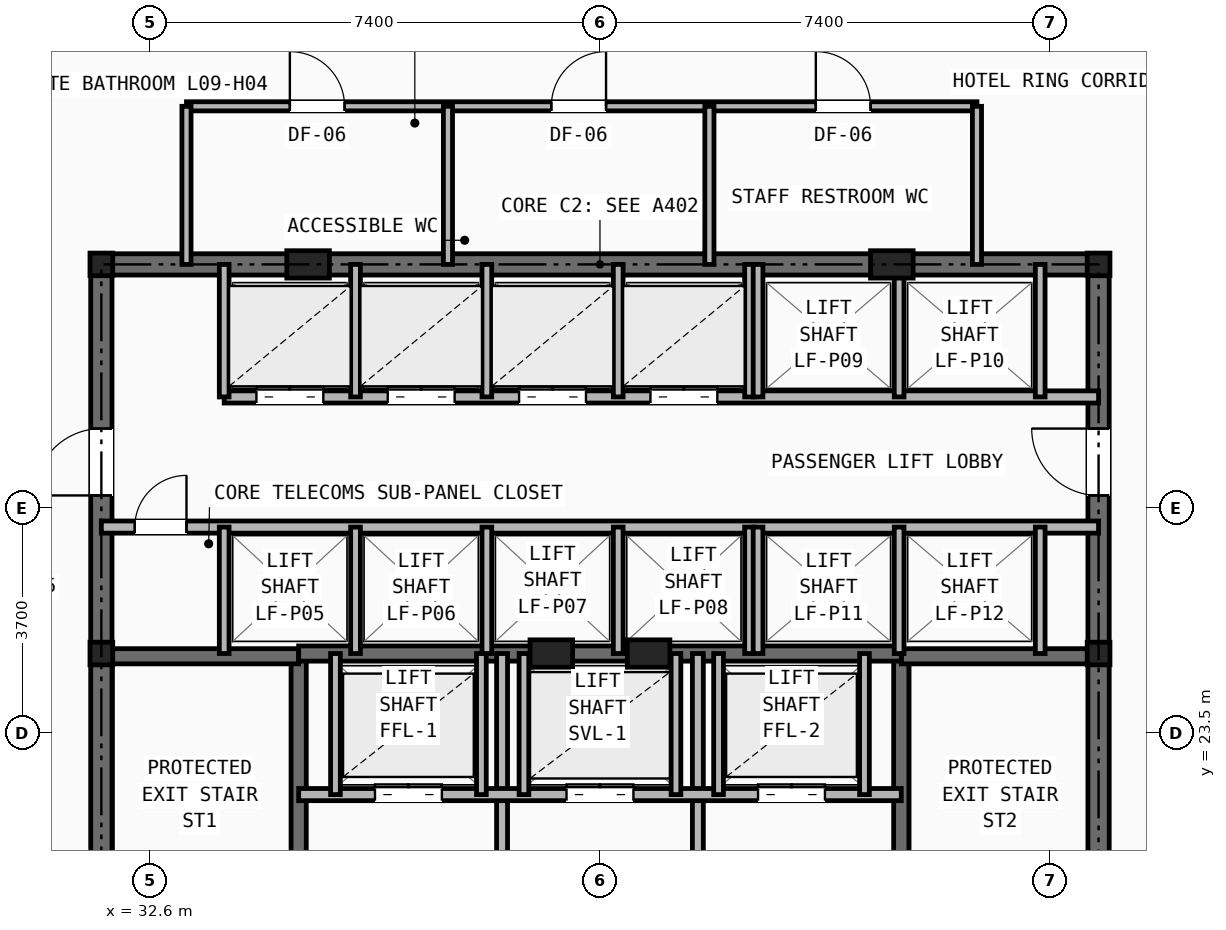
"""IFC4 building model, lengths in metres.
Left out: names, types, materials, properties, quantities, classifications, styles, units other than length and angle.
Written with IfcOpenShell. Run it as: python <this file> out.ifc"""

import sys

from ifc_helpers import new_model, si_unit, direction, frame, frame_2d, origin, origin_2d, place, context, subcontext, project, spatial, rectangle, i_section, extrude, element, fill, save


model = new_model("IFC4")
c1 = context("Model", 3, precision=1e-05, world=origin(), true_north=direction((0.0, 1.0)))
c2 = subcontext(c1, "Body", "Model", "MODEL_VIEW")
j1 = project(units=[si_unit("LENGTHUNIT", "METRE"), si_unit("PLANEANGLEUNIT", "RADIAN")], contexts=[c1])
p1 = place(None, origin())
s1 = spatial("IfcSite", under=j1, at=p1, CompositionType="ELEMENT")
p2 = place(p1, origin())
s2 = spatial("IfcBuilding", under=s1, at=p2, CompositionType="ELEMENT")
p3 = place(p2, frame((0.0, 0.0, 36.8)))
s3 = spatial("IfcBuildingStorey", under=s2, at=p3, CompositionType="ELEMENT", Elevation=36.8)
for number, where, z_axis, x_axis in (
    (1, (31.8, 24.8, 0.0), (0.0, 0.0, 1.0), (1.0, 0.0, 0.0)),
    (2, (48.2, 24.8, 0.0), (0.0, 0.0, 1.0), (1.0, 0.0, 0.0)),
    (3, (31.8, 31.2, 0.0), (0.0, 0.0, 1.0), (1.0, 0.0, 0.0)),
    (4, (48.2, 31.2, 0.0), (0.0, 0.0, 1.0), (1.0, 0.0, 0.0)),
):
    element("IfcColumn", number, at=place(p3, frame(where, z_axis=z_axis, x_axis=x_axis)), inside=s3, PredefinedType="COLUMN", context=c2, shape_type="SweptSolid", body=[
        extrude(i_section(OverallWidth=0.374, OverallDepth=0.372, WebThickness=0.016, FlangeThickness=0.026, at=origin_2d()), origin(), (0.0, 0.0, 1.0), 3.2),
    ])
for number, where, z_axis, x_axis in (
    (5, (35.2, 31.2, 0.0), (0.0, 0.0, 1.0), (1.0, 0.0, 0.0)),
    (6, (44.8, 31.2, 0.0), (0.0, 0.0, 1.0), (1.0, 0.0, 0.0)),
    (7, (39.2, 24.8, 0.0), (0.0, 0.0, 1.0), (1.0, 0.0, 0.0)),
    (8, (40.8, 24.8, 0.0), (0.0, 0.0, 1.0), (1.0, 0.0, 0.0)),
):
    element("IfcColumn", number, at=place(p3, frame(where, z_axis=z_axis, x_axis=x_axis)), inside=s3, PredefinedType="PILASTER", context=c2, shape_type="SweptSolid", body=[
        extrude(rectangle(XDim=0.7, YDim=0.45, at=origin_2d()), origin(), (0.0, 0.0, 1.0), 3.2),
    ])
p4 = place(p3, frame((31.8, 31.2, 0.0), z_axis=(0.0, 0.0, 1.0), x_axis=(1.0, 0.0, 0.0)))
e9 = element("IfcWall", 9, at=p4, inside=s3, PredefinedType="SHEAR", context=c2, shape_type="SweptSolid", body=[
    extrude(rectangle(XDim=16.4, YDim=0.35, at=frame_2d((8.2, 0.0))), origin(), (0.0, 0.0, 1.0), 2.98),
])
p5 = place(p3, frame((31.8, 16.4, 0.0), z_axis=(0.0, 0.0, 1.0), x_axis=(0.0, 1.0, 0.0)))
e10 = element("IfcWall", 10, at=p5, inside=s3, PredefinedType="SHEAR", context=c2, shape_type="SweptSolid", body=[
    extrude(rectangle(XDim=14.8, YDim=0.35, at=frame_2d((7.4, 0.0))), origin(), (0.0, 0.0, 1.0), 2.98),
])
p6 = place(p5, frame((11.0, 0.0, 0.0)))
e11 = element("IfcOpeningElement", 11, at=p6, cuts=e10, PredefinedType="OPENING", context=c2, shape_type="SweptSolid", body=[
    extrude(rectangle(XDim=1.1, YDim=2.15, at=frame_2d((0.55, 1.075))), frame((0.0, 0.185, 0.0), z_axis=(0.0, -1.0, 0.0), x_axis=(1.0, 0.0, 0.0)), (0.0, 0.0, 1.0), 0.37),
])
p7 = place(p3, frame((48.2, 16.4, 0.0), z_axis=(0.0, 0.0, 1.0), x_axis=(0.0, 1.0, 0.0)))
e12 = element("IfcWall", 12, at=p7, inside=s3, PredefinedType="SHEAR", context=c2, shape_type="SweptSolid", body=[
    extrude(rectangle(XDim=14.8, YDim=0.35, at=frame_2d((7.4, 0.0))), origin(), (0.0, 0.0, 1.0), 2.98),
])
p8 = place(p7, frame((11.0, 0.0, 0.0)))
e13 = element("IfcOpeningElement", 13, at=p8, cuts=e12, PredefinedType="OPENING", context=c2, shape_type="SweptSolid", body=[
    extrude(rectangle(XDim=1.1, YDim=2.15, at=frame_2d((0.55, 1.075))), frame((0.0, 0.185, 0.0), z_axis=(0.0, -1.0, 0.0), x_axis=(1.0, 0.0, 0.0)), (0.0, 0.0, 1.0), 0.37),
])
p9 = place(p3, frame((35.045, 16.4, 0.0), z_axis=(0.0, 0.0, 1.0), x_axis=(0.0, 1.0, 0.0)))
e14 = element("IfcWall", 14, at=p9, inside=s3, PredefinedType="SHEAR", context=c2, shape_type="SweptSolid", body=[
    extrude(rectangle(XDim=8.4, YDim=0.25, at=frame_2d((4.2, 0.0))), origin(), (0.0, 0.0, 1.0), 2.98),
])
p10 = place(p9, frame((0.45, 0.0, 0.0)))
e15 = element("IfcOpeningElement", 15, at=p10, cuts=e14, PredefinedType="OPENING", context=c2, shape_type="SweptSolid", body=[
    extrude(rectangle(XDim=0.95, YDim=2.1, at=frame_2d((0.475, 1.05))), frame((0.0, 0.135, 0.0), z_axis=(0.0, -1.0, 0.0), x_axis=(1.0, 0.0, 0.0)), (0.0, 0.0, 1.0), 0.27),
])
p11 = place(p3, frame((31.8, 24.755, 0.0), z_axis=(0.0, 0.0, 1.0), x_axis=(1.0, 0.0, 0.0)))
e16 = element("IfcWall", 16, at=p11, inside=s3, PredefinedType="SHEAR", context=c2, shape_type="SweptSolid", body=[
    extrude(rectangle(XDim=3.245, YDim=0.25, at=frame_2d((1.623, 0.0))), origin(), (0.0, 0.0, 1.0), 2.98),
])
p12 = place(p3, frame((44.955, 16.4, 0.0), z_axis=(0.0, 0.0, 1.0), x_axis=(0.0, 1.0, 0.0)))
e17 = element("IfcWall", 17, at=p12, inside=s3, PredefinedType="SHEAR", context=c2, shape_type="SweptSolid", body=[
    extrude(rectangle(XDim=8.4, YDim=0.25, at=frame_2d((4.2, 0.0))), origin(), (0.0, 0.0, 1.0), 2.98),
])
p13 = place(p12, frame((0.45, 0.0, 0.0)))
e18 = element("IfcOpeningElement", 18, at=p13, cuts=e17, PredefinedType="OPENING", context=c2, shape_type="SweptSolid", body=[
    extrude(rectangle(XDim=0.95, YDim=2.1, at=frame_2d((0.475, 1.05))), frame((0.0, 0.135, 0.0), z_axis=(0.0, -1.0, 0.0), x_axis=(1.0, 0.0, 0.0)), (0.0, 0.0, 1.0), 0.27),
])
p14 = place(p3, frame((44.955, 24.755, 0.0), z_axis=(0.0, 0.0, 1.0), x_axis=(1.0, 0.0, 0.0)))
e19 = element("IfcWall", 19, at=p14, inside=s3, PredefinedType="SHEAR", context=c2, shape_type="SweptSolid", body=[
    extrude(rectangle(XDim=3.245, YDim=0.25, at=frame_2d((1.623, 0.0))), origin(), (0.0, 0.0, 1.0), 2.98),
])
p15 = place(p3, frame((35.045, 24.8, 0.0), z_axis=(0.0, 0.0, 1.0), x_axis=(1.0, 0.0, 0.0)))
e20 = element("IfcWall", 20, at=p15, inside=s3, PredefinedType="SHEAR", context=c2, shape_type="SweptSolid", body=[
    extrude(rectangle(XDim=9.91, YDim=0.25, at=frame_2d((4.955, 0.0))), origin(), (0.0, 0.0, 1.0), 2.98),
])
p16 = place(p3, frame((38.39, 16.4, 0.0), z_axis=(0.0, 0.0, 1.0), x_axis=(0.0, 1.0, 0.0)))
e21 = element("IfcWall", 21, at=p16, inside=s3, PredefinedType="PARTITIONING", context=c2, shape_type="SweptSolid", body=[
    extrude(rectangle(XDim=8.4, YDim=0.18, at=frame_2d((4.2, 0.0))), origin(), (0.0, 0.0, 1.0), 2.431),
])
p17 = place(p16, frame((3.85, 0.0, 0.0)))
e22 = element("IfcOpeningElement", 22, at=p17, cuts=e21, PredefinedType="OPENING", context=c2, shape_type="SweptSolid", body=[
    extrude(rectangle(XDim=0.95, YDim=2.1, at=frame_2d((0.475, 1.05))), frame((0.0, 0.1, 0.0), z_axis=(0.0, -1.0, 0.0), x_axis=(1.0, 0.0, 0.0)), (0.0, 0.0, 1.0), 0.2),
])
p18 = place(p3, frame((41.61, 16.4, 0.0), z_axis=(0.0, 0.0, 1.0), x_axis=(0.0, 1.0, 0.0)))
e23 = element("IfcWall", 23, at=p18, inside=s3, PredefinedType="PARTITIONING", context=c2, shape_type="SweptSolid", body=[
    extrude(rectangle(XDim=8.4, YDim=0.18, at=frame_2d((4.2, 0.0))), origin(), (0.0, 0.0, 1.0), 2.431),
])
p19 = place(p3, frame((35.045, 22.48, 0.0), z_axis=(0.0, 0.0, 1.0), x_axis=(1.0, 0.0, 0.0)))
e24 = element("IfcWall", 24, at=p19, inside=s3, PredefinedType="SOLIDWALL", context=c2, shape_type="SweptSolid", body=[
    extrude(rectangle(XDim=9.91, YDim=0.2, at=frame_2d((4.955, 0.0))), origin(), (0.0, 0.0, 1.0), 2.98),
])
p20 = place(p19, frame((1.255, 0.0, 0.0)))
e25 = element("IfcOpeningElement", 25, at=p20, cuts=e24, PredefinedType="OPENING", context=c2, shape_type="SweptSolid", body=[
    extrude(rectangle(XDim=1.1, YDim=2.15, at=frame_2d((0.55, 1.075))), frame((0.0, 0.11, 0.0), z_axis=(0.0, -1.0, 0.0), x_axis=(1.0, 0.0, 0.0)), (0.0, 0.0, 1.0), 0.22),
])
p21 = place(p19, frame((7.555, 0.0, 0.0)))
e26 = element("IfcOpeningElement", 26, at=p21, cuts=e24, PredefinedType="OPENING", context=c2, shape_type="SweptSolid", body=[
    extrude(rectangle(XDim=1.1, YDim=2.15, at=frame_2d((0.55, 1.075))), frame((0.0, 0.11, 0.0), z_axis=(0.0, -1.0, 0.0), x_axis=(1.0, 0.0, 0.0)), (0.0, 0.0, 1.0), 0.22),
])
p22 = place(p19, frame((4.405, 0.0, 0.0)))
e27 = element("IfcOpeningElement", 27, at=p22, cuts=e24, PredefinedType="OPENING", context=c2, shape_type="SweptSolid", body=[
    extrude(rectangle(XDim=1.1, YDim=2.15, at=frame_2d((0.55, 1.075))), frame((0.0, 0.11, 0.0), z_axis=(0.0, -1.0, 0.0), x_axis=(1.0, 0.0, 0.0)), (0.0, 0.0, 1.0), 0.22),
])
for number, where, z_axis, x_axis in (
    (28, (35.65, 22.48, 0.0), (0.0, 0.0, 1.0), (0.0, 1.0, 0.0)),
    (29, (38.05, 22.48, 0.0), (0.0, 0.0, 1.0), (0.0, 1.0, 0.0)),
    (30, (41.95, 22.48, 0.0), (0.0, 0.0, 1.0), (0.0, 1.0, 0.0)),
    (31, (44.35, 22.48, 0.0), (0.0, 0.0, 1.0), (0.0, 1.0, 0.0)),
    (32, (38.75, 22.48, 0.0), (0.0, 0.0, 1.0), (0.0, 1.0, 0.0)),
    (33, (41.25, 22.48, 0.0), (0.0, 0.0, 1.0), (0.0, 1.0, 0.0)),
):
    element("IfcWall", number, at=place(p3, frame(where, z_axis=z_axis, x_axis=x_axis)), inside=s3, PredefinedType="SOLIDWALL", context=c2, shape_type="SweptSolid", body=[
        extrude(rectangle(XDim=2.32, YDim=0.16, at=frame_2d((1.16, 0.0))), origin(), (0.0, 0.0, 1.0), 2.98),
    ])
p23 = place(p3, frame((33.82, 29.02, 0.0), z_axis=(0.0, 0.0, 1.0), x_axis=(1.0, 0.0, 0.0)))
e34 = element("IfcWall", 34, at=p23, inside=s3, PredefinedType="SOLIDWALL", context=c2, shape_type="SweptSolid", body=[
    extrude(rectangle(XDim=14.38, YDim=0.2, at=frame_2d((7.19, 0.0))), origin(), (0.0, 0.0, 1.0), 2.431),
])
p24 = place(p23, frame((0.53, 0.0, 0.0)))
e35 = element("IfcOpeningElement", 35, at=p24, cuts=e34, PredefinedType="OPENING", context=c2, shape_type="SweptSolid", body=[
    extrude(rectangle(XDim=1.1, YDim=2.15, at=frame_2d((0.55, 1.075))), frame((0.0, 0.11, 0.0), z_axis=(0.0, -1.0, 0.0), x_axis=(1.0, 0.0, 0.0)), (0.0, 0.0, 1.0), 0.22),
])
p25 = place(p23, frame((2.69, 0.0, 0.0)))
e36 = element("IfcOpeningElement", 36, at=p25, cuts=e34, PredefinedType="OPENING", context=c2, shape_type="SweptSolid", body=[
    extrude(rectangle(XDim=1.1, YDim=2.15, at=frame_2d((0.55, 1.075))), frame((0.0, 0.11, 0.0), z_axis=(0.0, -1.0, 0.0), x_axis=(1.0, 0.0, 0.0)), (0.0, 0.0, 1.0), 0.22),
])
p26 = place(p23, frame((4.85, 0.0, 0.0)))
e37 = element("IfcOpeningElement", 37, at=p26, cuts=e34, PredefinedType="OPENING", context=c2, shape_type="SweptSolid", body=[
    extrude(rectangle(XDim=1.1, YDim=2.15, at=frame_2d((0.55, 1.075))), frame((0.0, 0.11, 0.0), z_axis=(0.0, -1.0, 0.0), x_axis=(1.0, 0.0, 0.0)), (0.0, 0.0, 1.0), 0.22),
])
p27 = place(p23, frame((7.01, 0.0, 0.0)))
e38 = element("IfcOpeningElement", 38, at=p27, cuts=e34, PredefinedType="OPENING", context=c2, shape_type="SweptSolid", body=[
    extrude(rectangle(XDim=1.1, YDim=2.15, at=frame_2d((0.55, 1.075))), frame((0.0, 0.11, 0.0), z_axis=(0.0, -1.0, 0.0), x_axis=(1.0, 0.0, 0.0)), (0.0, 0.0, 1.0), 0.22),
])
p28 = place(p3, frame((31.8, 26.88, 0.0), z_axis=(0.0, 0.0, 1.0), x_axis=(1.0, 0.0, 0.0)))
e39 = element("IfcWall", 39, at=p28, inside=s3, PredefinedType="SOLIDWALL", context=c2, shape_type="SweptSolid", body=[
    extrude(rectangle(XDim=16.4, YDim=0.2, at=frame_2d((8.2, 0.0))), origin(), (0.0, 0.0, 1.0), 2.431),
])
p29 = place(p28, frame((0.55, 0.0, 0.0)))
e40 = element("IfcOpeningElement", 40, at=p29, cuts=e39, PredefinedType="OPENING", context=c2, shape_type="SweptSolid", body=[
    extrude(rectangle(XDim=0.85, YDim=2.05, at=frame_2d((0.425, 1.025))), frame((0.0, 0.11, 0.0), z_axis=(0.0, -1.0, 0.0), x_axis=(1.0, 0.0, 0.0)), (0.0, 0.0, 1.0), 0.22),
])
p30 = place(p3, frame((33.82, 29.02, 0.0), z_axis=(0.0, 0.0, 1.0), x_axis=(0.0, 1.0, 0.0)))
e41 = element("IfcWall", 41, at=p30, inside=s3, PredefinedType="SOLIDWALL", context=c2, shape_type="SweptSolid", body=[
    extrude(rectangle(XDim=2.18, YDim=0.16, at=frame_2d((1.09, 0.0))), origin(), (0.0, 0.0, 1.0), 2.431),
])
p31 = place(p3, frame((33.82, 24.8, 0.0), z_axis=(0.0, 0.0, 1.0), x_axis=(0.0, 1.0, 0.0)))
e42 = element("IfcWall", 42, at=p31, inside=s3, PredefinedType="SOLIDWALL", context=c2, shape_type="SweptSolid", body=[
    extrude(rectangle(XDim=2.08, YDim=0.16, at=frame_2d((1.04, 0.0))), origin(), (0.0, 0.0, 1.0), 2.98),
])
for number, where, z_axis, x_axis in (
    (43, (35.98, 29.02, 0.0), (0.0, 0.0, 1.0), (0.0, 1.0, 0.0)),
    (44, (38.14, 29.02, 0.0), (0.0, 0.0, 1.0), (0.0, 1.0, 0.0)),
    (45, (40.3, 29.02, 0.0), (0.0, 0.0, 1.0), (0.0, 1.0, 0.0)),
    (46, (42.46, 29.02, 0.0), (0.0, 0.0, 1.0), (0.0, 1.0, 0.0)),
):
    element("IfcWall", number, at=place(p3, frame(where, z_axis=z_axis, x_axis=x_axis)), inside=s3, PredefinedType="SOLIDWALL", context=c2, shape_type="SweptSolid", body=[
        extrude(rectangle(XDim=2.18, YDim=0.16, at=frame_2d((1.09, 0.0))), origin(), (0.0, 0.0, 1.0), 2.431),
    ])
for number, where, z_axis, x_axis in (
    (47, (35.98, 24.8, 0.0), (0.0, 0.0, 1.0), (0.0, 1.0, 0.0)),
    (48, (38.14, 24.8, 0.0), (0.0, 0.0, 1.0), (0.0, 1.0, 0.0)),
    (49, (40.3, 24.8, 0.0), (0.0, 0.0, 1.0), (0.0, 1.0, 0.0)),
    (50, (42.46, 24.8, 0.0), (0.0, 0.0, 1.0), (0.0, 1.0, 0.0)),
):
    element("IfcWall", number, at=place(p3, frame(where, z_axis=z_axis, x_axis=x_axis)), inside=s3, PredefinedType="SOLIDWALL", context=c2, shape_type="SweptSolid", body=[
        extrude(rectangle(XDim=2.08, YDim=0.16, at=frame_2d((1.04, 0.0))), origin(), (0.0, 0.0, 1.0), 2.98),
    ])
for number, where, z_axis, x_axis in (
    (51, (42.6, 29.02, 0.0), (0.0, 0.0, 1.0), (0.0, 1.0, 0.0)),
    (52, (44.92, 29.02, 0.0), (0.0, 0.0, 1.0), (0.0, 1.0, 0.0)),
    (53, (47.24, 29.02, 0.0), (0.0, 0.0, 1.0), (0.0, 1.0, 0.0)),
):
    element("IfcWall", number, at=place(p3, frame(where, z_axis=z_axis, x_axis=x_axis)), inside=s3, PredefinedType="SOLIDWALL", context=c2, shape_type="SweptSolid", body=[
        extrude(rectangle(XDim=2.18, YDim=0.16, at=frame_2d((1.09, 0.0))), origin(), (0.0, 0.0, 1.0), 2.431),
    ])
for number, where, z_axis, x_axis in (
    (54, (42.6, 24.8, 0.0), (0.0, 0.0, 1.0), (0.0, 1.0, 0.0)),
    (55, (44.92, 24.8, 0.0), (0.0, 0.0, 1.0), (0.0, 1.0, 0.0)),
    (56, (47.24, 24.8, 0.0), (0.0, 0.0, 1.0), (0.0, 1.0, 0.0)),
):
    element("IfcWall", number, at=place(p3, frame(where, z_axis=z_axis, x_axis=x_axis)), inside=s3, PredefinedType="SOLIDWALL", context=c2, shape_type="SweptSolid", body=[
        extrude(rectangle(XDim=2.08, YDim=0.16, at=frame_2d((1.04, 0.0))), origin(), (0.0, 0.0, 1.0), 2.98),
    ])
p32 = place(p3, frame((33.2, 33.8, 0.0), z_axis=(0.0, 0.0, 1.0), x_axis=(1.0, 0.0, 0.0)))
e57 = element("IfcWall", 57, at=p32, inside=s3, PredefinedType="PARTITIONING", context=c2, shape_type="SweptSolid", body=[
    extrude(rectangle(XDim=13.0, YDim=0.15, at=frame_2d((6.5, 0.0))), origin(), (0.0, 0.0, 1.0), 2.98),
])
p33 = place(p32, frame((1.7, 0.0, 0.0)))
e58 = element("IfcOpeningElement", 58, at=p33, cuts=e57, PredefinedType="OPENING", context=c2, shape_type="SweptSolid", body=[
    extrude(rectangle(XDim=0.9, YDim=2.1, at=frame_2d((0.45, 1.05))), frame((0.0, 0.085, 0.0), z_axis=(0.0, -1.0, 0.0), x_axis=(1.0, 0.0, 0.0)), (0.0, 0.0, 1.0), 0.17),
])
p34 = place(p32, frame((6.0, 0.0, 0.0)))
e59 = element("IfcOpeningElement", 59, at=p34, cuts=e57, PredefinedType="OPENING", context=c2, shape_type="SweptSolid", body=[
    extrude(rectangle(XDim=0.9, YDim=2.1, at=frame_2d((0.45, 1.05))), frame((0.0, 0.085, 0.0), z_axis=(0.0, -1.0, 0.0), x_axis=(1.0, 0.0, 0.0)), (0.0, 0.0, 1.0), 0.17),
])
p35 = place(p32, frame((10.35, 0.0, 0.0)))
e60 = element("IfcOpeningElement", 60, at=p35, cuts=e57, PredefinedType="OPENING", context=c2, shape_type="SweptSolid", body=[
    extrude(rectangle(XDim=0.9, YDim=2.1, at=frame_2d((0.45, 1.05))), frame((0.0, 0.085, 0.0), z_axis=(0.0, -1.0, 0.0), x_axis=(1.0, 0.0, 0.0)), (0.0, 0.0, 1.0), 0.17),
])
for number, where, z_axis, x_axis in (
    (61, (33.2, 31.2, 0.0), (0.0, 0.0, 1.0), (0.0, 1.0, 0.0)),
    (62, (46.2, 31.2, 0.0), (0.0, 0.0, 1.0), (0.0, 1.0, 0.0)),
    (63, (37.5, 31.2, 0.0), (0.0, 0.0, 1.0), (0.0, 1.0, 0.0)),
    (64, (41.8, 31.2, 0.0), (0.0, 0.0, 1.0), (0.0, 1.0, 0.0)),
):
    element("IfcWall", number, at=place(p3, frame(where, z_axis=z_axis, x_axis=x_axis)), inside=s3, PredefinedType="PARTITIONING", context=c2, shape_type="SweptSolid", body=[
        extrude(rectangle(XDim=2.6, YDim=0.15, at=frame_2d((1.3, 0.0))), origin(), (0.0, 0.0, 1.0), 2.431),
    ])
p36 = place(p20, origin())
e65 = element("IfcDoor", 65, at=p36, inside=s3, OperationType="DOUBLE_DOOR_SLIDING", PredefinedType="DOOR", context=c2, shape_type="SweptSolid", body=[
    extrude(rectangle(XDim=1.1, YDim=2.15, at=frame_2d((0.55, 1.075))), frame((0.0, 0.025, 0.0), z_axis=(0.0, -1.0, 0.0), x_axis=(1.0, 0.0, 0.0)), (0.0, 0.0, 1.0), 0.05),
])
fill(e25, e65)
p37 = place(p21, origin())
e66 = element("IfcDoor", 66, at=p37, inside=s3, OperationType="DOUBLE_DOOR_SLIDING", PredefinedType="DOOR", context=c2, shape_type="SweptSolid", body=[
    extrude(rectangle(XDim=1.1, YDim=2.15, at=frame_2d((0.55, 1.075))), frame((0.0, 0.025, 0.0), z_axis=(0.0, -1.0, 0.0), x_axis=(1.0, 0.0, 0.0)), (0.0, 0.0, 1.0), 0.05),
])
fill(e26, e66)
p38 = place(p22, origin())
e67 = element("IfcDoor", 67, at=p38, inside=s3, OperationType="DOUBLE_DOOR_SLIDING", PredefinedType="DOOR", context=c2, shape_type="SweptSolid", body=[
    extrude(rectangle(XDim=1.1, YDim=2.15, at=frame_2d((0.55, 1.075))), frame((0.0, 0.025, 0.0), z_axis=(0.0, -1.0, 0.0), x_axis=(1.0, 0.0, 0.0)), (0.0, 0.0, 1.0), 0.05),
])
fill(e27, e67)
p39 = place(p29, origin())
e68 = element("IfcDoor", 68, at=p39, inside=s3, OperationType="SINGLE_SWING_RIGHT", PredefinedType="DOOR", context=c2, shape_type="SweptSolid", body=[
    extrude(rectangle(XDim=0.85, YDim=2.05, at=frame_2d((0.425, 1.025))), frame((0.0, 0.025, 0.0), z_axis=(0.0, -1.0, 0.0), x_axis=(1.0, 0.0, 0.0)), (0.0, 0.0, 1.0), 0.05),
])
fill(e40, e68)
p40 = place(p6, origin())
e69 = element("IfcDoor", 69, at=p40, inside=s3, OperationType="SINGLE_SWING_LEFT", PredefinedType="DOOR", context=c2, shape_type="SweptSolid", body=[
    extrude(rectangle(XDim=1.1, YDim=2.15, at=frame_2d((0.55, 1.075))), frame((0.0, 0.025, 0.0), z_axis=(0.0, -1.0, 0.0), x_axis=(1.0, 0.0, 0.0)), (0.0, 0.0, 1.0), 0.05),
])
fill(e11, e69)
p41 = place(p8, origin())
e70 = element("IfcDoor", 70, at=p41, inside=s3, OperationType="SINGLE_SWING_RIGHT", PredefinedType="DOOR", context=c2, shape_type="SweptSolid", body=[
    extrude(rectangle(XDim=1.1, YDim=2.15, at=frame_2d((0.55, 1.075))), frame((0.0, 0.025, 0.0), z_axis=(0.0, -1.0, 0.0), x_axis=(1.0, 0.0, 0.0)), (0.0, 0.0, 1.0), 0.05),
])
fill(e13, e70)
p42 = place(p24, origin())
e71 = element("IfcDoor", 71, at=p42, inside=s3, OperationType="DOUBLE_DOOR_SLIDING", PredefinedType="DOOR", context=c2, shape_type="SweptSolid", body=[
    extrude(rectangle(XDim=1.1, YDim=2.15, at=frame_2d((0.55, 1.075))), frame((0.0, 0.025, 0.0), z_axis=(0.0, -1.0, 0.0), x_axis=(1.0, 0.0, 0.0)), (0.0, 0.0, 1.0), 0.05),
])
fill(e35, e71)
p43 = place(p25, origin())
e72 = element("IfcDoor", 72, at=p43, inside=s3, OperationType="DOUBLE_DOOR_SLIDING", PredefinedType="DOOR", context=c2, shape_type="SweptSolid", body=[
    extrude(rectangle(XDim=1.1, YDim=2.15, at=frame_2d((0.55, 1.075))), frame((0.0, 0.025, 0.0), z_axis=(0.0, -1.0, 0.0), x_axis=(1.0, 0.0, 0.0)), (0.0, 0.0, 1.0), 0.05),
])
fill(e36, e72)
p44 = place(p26, origin())
e73 = element("IfcDoor", 73, at=p44, inside=s3, OperationType="DOUBLE_DOOR_SLIDING", PredefinedType="DOOR", context=c2, shape_type="SweptSolid", body=[
    extrude(rectangle(XDim=1.1, YDim=2.15, at=frame_2d((0.55, 1.075))), frame((0.0, 0.025, 0.0), z_axis=(0.0, -1.0, 0.0), x_axis=(1.0, 0.0, 0.0)), (0.0, 0.0, 1.0), 0.05),
])
fill(e37, e73)
p45 = place(p27, origin())
e74 = element("IfcDoor", 74, at=p45, inside=s3, OperationType="DOUBLE_DOOR_SLIDING", PredefinedType="DOOR", context=c2, shape_type="SweptSolid", body=[
    extrude(rectangle(XDim=1.1, YDim=2.15, at=frame_2d((0.55, 1.075))), frame((0.0, 0.025, 0.0), z_axis=(0.0, -1.0, 0.0), x_axis=(1.0, 0.0, 0.0)), (0.0, 0.0, 1.0), 0.05),
])
fill(e38, e74)
p46 = place(p33, origin())
e75 = element("IfcDoor", 75, at=p46, inside=s3, OperationType="SINGLE_SWING_LEFT", PredefinedType="DOOR", context=c2, shape_type="SweptSolid", body=[
    extrude(rectangle(XDim=0.9, YDim=2.1, at=frame_2d((0.45, 1.05))), frame((0.0, 0.025, 0.0), z_axis=(0.0, -1.0, 0.0), x_axis=(1.0, 0.0, 0.0)), (0.0, 0.0, 1.0), 0.05),
])
fill(e58, e75)
p47 = place(p34, origin())
e76 = element("IfcDoor", 76, at=p47, inside=s3, OperationType="SINGLE_SWING_RIGHT", PredefinedType="DOOR", context=c2, shape_type="SweptSolid", body=[
    extrude(rectangle(XDim=0.9, YDim=2.1, at=frame_2d((0.45, 1.05))), frame((0.0, 0.025, 0.0), z_axis=(0.0, -1.0, 0.0), x_axis=(1.0, 0.0, 0.0)), (0.0, 0.0, 1.0), 0.05),
])
fill(e59, e76)
p48 = place(p35, origin())
e77 = element("IfcDoor", 77, at=p48, inside=s3, OperationType="SINGLE_SWING_LEFT", PredefinedType="DOOR", context=c2, shape_type="SweptSolid", body=[
    extrude(rectangle(XDim=0.9, YDim=2.1, at=frame_2d((0.45, 1.05))), frame((0.0, 0.025, 0.0), z_axis=(0.0, -1.0, 0.0), x_axis=(1.0, 0.0, 0.0)), (0.0, 0.0, 1.0), 0.05),
])
fill(e60, e77)
save(model, sys.argv[1])
